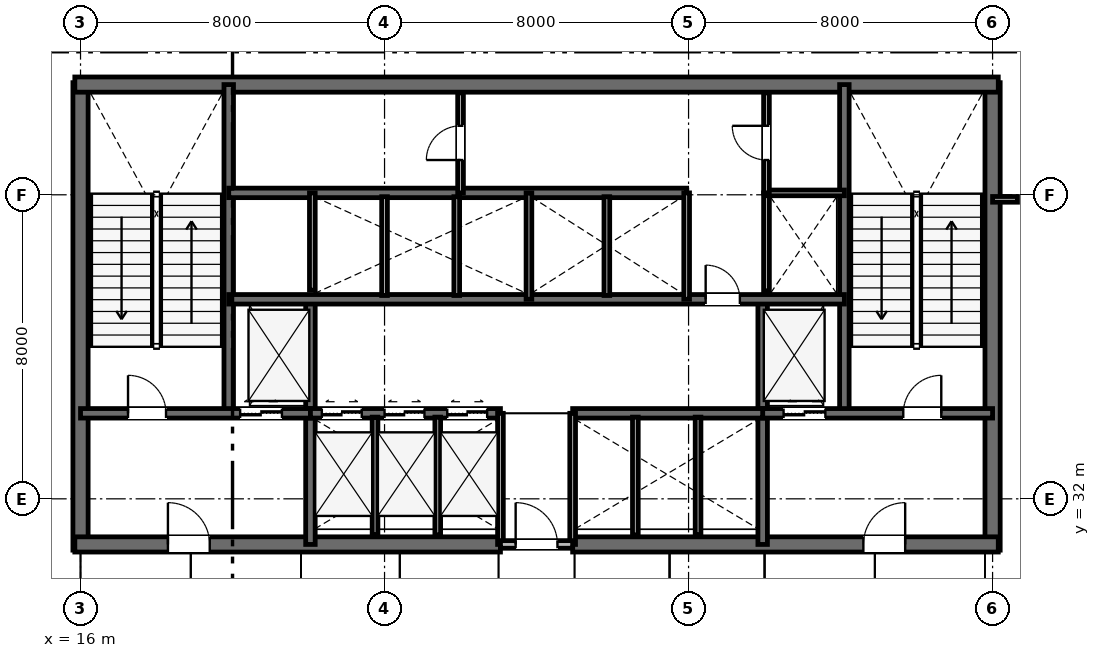
"""IFC4 building model, lengths in metres.
Left out: names, types, materials, properties, quantities, classifications, styles, units other than length and angle.
Written with IfcOpenShell. Run it as: python <this file> out.ifc"""

import sys

from ifc_helpers import new_model, si_unit, direction, frame, frame_2d, origin, place, context, subcontext, project, spatial, rectangle, extrude, element, fill, save


model = new_model("IFC4")
c1 = context("Model", 3, precision=1e-05, world=origin(), true_north=direction((0.0, 1.0)))
c2 = subcontext(c1, "Body", "Model", "MODEL_VIEW")
j1 = project(units=[si_unit("LENGTHUNIT", "METRE"), si_unit("PLANEANGLEUNIT", "RADIAN")], contexts=[c1])
p1 = place(None, origin())
s1 = spatial("IfcSite", under=j1, at=p1, CompositionType="ELEMENT")
p2 = place(p1, origin())
s2 = spatial("IfcBuilding", under=s1, at=p2, CompositionType="ELEMENT")
p3 = place(p2, frame((0.0, 0.0, 21.3)))
s3 = spatial("IfcBuildingStorey", under=s2, at=p3, CompositionType="ELEMENT", Elevation=21.3)
for number, where, z_axis, x_axis in (
    (1, (16.0, 30.65, 0.0), (0.0, 0.0, 1.0), (0.0, 1.0, 0.0)),
    (2, (40.0, 30.65, 0.0), (0.0, 0.0, 1.0), (0.0, 1.0, 0.0)),
):
    element("IfcWall", number, at=place(p3, frame(where, z_axis=z_axis, x_axis=x_axis)), inside=s3, PredefinedType="SHEAR", context=c2, shape_type="SweptSolid", body=[
        extrude(rectangle(XDim=12.3, YDim=0.4, at=frame_2d((6.15, 0.0))), origin(), (0.0, 0.0, 1.0), 4.5),
    ])
p4 = place(p3, frame((15.85, 42.9, 0.0), z_axis=(0.0, 0.0, 1.0), x_axis=(1.0, 0.0, 0.0)))
e3 = element("IfcWall", 3, at=p4, inside=s3, PredefinedType="SHEAR", context=c2, shape_type="SweptSolid", body=[
    extrude(rectangle(XDim=24.3, YDim=0.4, at=frame_2d((12.15, 0.0))), origin(), (0.0, 0.0, 1.0), 4.5),
])
p5 = place(p3, frame((15.85, 30.8, 0.0), z_axis=(0.0, 0.0, 1.0), x_axis=(1.0, 0.0, 0.0)))
e4 = element("IfcWall", 4, at=p5, inside=s3, PredefinedType="SHEAR", context=c2, shape_type="SweptSolid", body=[
    extrude(rectangle(XDim=11.2, YDim=0.4, at=frame_2d((5.6, 0.0))), origin(), (0.0, 0.0, 1.0), 4.5),
])
p6 = place(p5, frame((2.45, 0.0, 0.0)))
e5 = element("IfcOpeningElement", 5, at=p6, cuts=e4, PredefinedType="OPENING", context=c2, shape_type="SweptSolid", body=[
    extrude(rectangle(XDim=1.1, YDim=2.15, at=frame_2d((0.55, 1.075))), frame((0.0, 0.21, 0.0), z_axis=(0.0, -1.0, 0.0), x_axis=(1.0, 0.0, 0.0)), (0.0, 0.0, 1.0), 0.42),
])
p7 = place(p3, frame((28.95, 30.8, 0.0), z_axis=(0.0, 0.0, 1.0), x_axis=(1.0, 0.0, 0.0)))
e6 = element("IfcWall", 6, at=p7, inside=s3, PredefinedType="SHEAR", context=c2, shape_type="SweptSolid", body=[
    extrude(rectangle(XDim=11.2, YDim=0.4, at=frame_2d((5.6, 0.0))), origin(), (0.0, 0.0, 1.0), 4.5),
])
p8 = place(p7, frame((7.65, 0.0, 0.0)))
e7 = element("IfcOpeningElement", 7, at=p8, cuts=e6, PredefinedType="OPENING", context=c2, shape_type="SweptSolid", body=[
    extrude(rectangle(XDim=1.1, YDim=2.15, at=frame_2d((0.55, 1.075))), frame((0.0, 0.21, 0.0), z_axis=(0.0, -1.0, 0.0), x_axis=(1.0, 0.0, 0.0)), (0.0, 0.0, 1.0), 0.42),
])
for number, where, z_axis, x_axis in (
    (8, (19.9, 34.25, 0.0), (0.0, 0.0, 1.0), (0.0, 1.0, 0.0)),
    (9, (36.1, 34.25, 0.0), (0.0, 0.0, 1.0), (0.0, 1.0, 0.0)),
):
    element("IfcWall", number, at=place(p3, frame(where, z_axis=z_axis, x_axis=x_axis)), inside=s3, PredefinedType="SHEAR", context=c2, shape_type="SweptSolid", body=[
        extrude(rectangle(XDim=8.65, YDim=0.25, at=frame_2d((4.325, 0.0))), origin(), (0.0, 0.0, 1.0), 4.5),
    ])
for number, where, z_axis, x_axis in (
    (10, (22.05, 30.8, 0.0), (0.0, 0.0, 1.0), (0.0, 1.0, 0.0)),
    (11, (33.95, 30.8, 0.0), (0.0, 0.0, 1.0), (0.0, 1.0, 0.0)),
):
    element("IfcWall", number, at=place(p3, frame(where, z_axis=z_axis, x_axis=x_axis)), inside=s3, PredefinedType="SHEAR", context=c2, shape_type="SweptSolid", body=[
        extrude(rectangle(XDim=6.45, YDim=0.25, at=frame_2d((3.225, 0.0))), origin(), (0.0, 0.0, 1.0), 4.5),
    ])
p9 = place(p3, frame((16.0, 34.25, 0.0), z_axis=(0.0, 0.0, 1.0), x_axis=(1.0, 0.0, 0.0)))
e12 = element("IfcWall", 12, at=p9, inside=s3, PredefinedType="SHEAR", context=c2, shape_type="SweptSolid", body=[
    extrude(rectangle(XDim=6.05, YDim=0.25, at=frame_2d((3.025, 0.0))), origin(), (0.0, 0.0, 1.0), 4.5),
])
p10 = place(p9, frame((1.25, 0.0, 0.0)))
e13 = element("IfcOpeningElement", 13, at=p10, cuts=e12, PredefinedType="OPENING", context=c2, shape_type="SweptSolid", body=[
    extrude(rectangle(XDim=1.0, YDim=2.15, at=frame_2d((0.5, 1.075))), frame((0.0, 0.135, 0.0), z_axis=(0.0, -1.0, 0.0), x_axis=(1.0, 0.0, 0.0)), (0.0, 0.0, 1.0), 0.27),
])
p11 = place(p9, frame((4.2, 0.0, 0.0)))
e14 = element("IfcOpeningElement", 14, at=p11, cuts=e12, PredefinedType="OPENING", context=c2, shape_type="SweptSolid", body=[
    extrude(rectangle(XDim=1.1, YDim=2.15, at=frame_2d((0.55, 1.075))), frame((0.0, 0.135, 0.0), z_axis=(0.0, -1.0, 0.0), x_axis=(1.0, 0.0, 0.0)), (0.0, 0.0, 1.0), 0.27),
])
p12 = place(p3, frame((33.95, 34.25, 0.0), z_axis=(0.0, 0.0, 1.0), x_axis=(1.0, 0.0, 0.0)))
e15 = element("IfcWall", 15, at=p12, inside=s3, PredefinedType="SHEAR", context=c2, shape_type="SweptSolid", body=[
    extrude(rectangle(XDim=6.05, YDim=0.25, at=frame_2d((3.025, 0.0))), origin(), (0.0, 0.0, 1.0), 4.5),
])
p13 = place(p12, frame((3.7, 0.0, 0.0)))
e16 = element("IfcOpeningElement", 16, at=p13, cuts=e15, PredefinedType="OPENING", context=c2, shape_type="SweptSolid", body=[
    extrude(rectangle(XDim=1.0, YDim=2.15, at=frame_2d((0.5, 1.075))), frame((0.0, 0.135, 0.0), z_axis=(0.0, -1.0, 0.0), x_axis=(1.0, 0.0, 0.0)), (0.0, 0.0, 1.0), 0.27),
])
p14 = place(p12, frame((0.55, 0.0, 0.0)))
e17 = element("IfcOpeningElement", 17, at=p14, cuts=e15, PredefinedType="OPENING", context=c2, shape_type="SweptSolid", body=[
    extrude(rectangle(XDim=1.1, YDim=2.15, at=frame_2d((0.55, 1.075))), frame((0.0, 0.135, 0.0), z_axis=(0.0, -1.0, 0.0), x_axis=(1.0, 0.0, 0.0)), (0.0, 0.0, 1.0), 0.27),
])
p15 = place(p3, frame((22.05, 34.25, 0.0), z_axis=(0.0, 0.0, 1.0), x_axis=(1.0, 0.0, 0.0)))
e18 = element("IfcWall", 18, at=p15, inside=s3, PredefinedType="SHEAR", context=c2, shape_type="SweptSolid", body=[
    extrude(rectangle(XDim=5.0, YDim=0.25, at=frame_2d((2.5, 0.0))), origin(), (0.0, 0.0, 1.0), 4.5),
])
p16 = place(p15, frame((0.3, 0.0, 0.0)))
e19 = element("IfcOpeningElement", 19, at=p16, cuts=e18, PredefinedType="OPENING", context=c2, shape_type="SweptSolid", body=[
    extrude(rectangle(XDim=1.05, YDim=2.15, at=frame_2d((0.525, 1.075))), frame((0.0, 0.135, 0.0), z_axis=(0.0, -1.0, 0.0), x_axis=(1.0, 0.0, 0.0)), (0.0, 0.0, 1.0), 0.27),
])
p17 = place(p15, frame((1.95, 0.0, 0.0)))
e20 = element("IfcOpeningElement", 20, at=p17, cuts=e18, PredefinedType="OPENING", context=c2, shape_type="SweptSolid", body=[
    extrude(rectangle(XDim=1.05, YDim=2.15, at=frame_2d((0.525, 1.075))), frame((0.0, 0.135, 0.0), z_axis=(0.0, -1.0, 0.0), x_axis=(1.0, 0.0, 0.0)), (0.0, 0.0, 1.0), 0.27),
])
p18 = place(p15, frame((3.6, 0.0, 0.0)))
e21 = element("IfcOpeningElement", 21, at=p18, cuts=e18, PredefinedType="OPENING", context=c2, shape_type="SweptSolid", body=[
    extrude(rectangle(XDim=1.05, YDim=2.15, at=frame_2d((0.525, 1.075))), frame((0.0, 0.135, 0.0), z_axis=(0.0, -1.0, 0.0), x_axis=(1.0, 0.0, 0.0)), (0.0, 0.0, 1.0), 0.27),
])
p19 = place(p3, frame((28.95, 34.25, 0.0), z_axis=(0.0, 0.0, 1.0), x_axis=(1.0, 0.0, 0.0)))
e22 = element("IfcWall", 22, at=p19, inside=s3, PredefinedType="SHEAR", context=c2, shape_type="SweptSolid", body=[
    extrude(rectangle(XDim=5.0, YDim=0.25, at=frame_2d((2.5, 0.0))), origin(), (0.0, 0.0, 1.0), 4.5),
])
p20 = place(p3, frame((19.9, 37.25, 0.0), z_axis=(0.0, 0.0, 1.0), x_axis=(1.0, 0.0, 0.0)))
e23 = element("IfcWall", 23, at=p20, inside=s3, PredefinedType="SHEAR", context=c2, shape_type="SweptSolid", body=[
    extrude(rectangle(XDim=16.2, YDim=0.25, at=frame_2d((8.1, 0.0))), origin(), (0.0, 0.0, 1.0), 4.5),
])
p21 = place(p20, frame((12.55, 0.0, 0.0)))
e24 = element("IfcOpeningElement", 24, at=p21, cuts=e23, PredefinedType="OPENING", context=c2, shape_type="SweptSolid", body=[
    extrude(rectangle(XDim=0.9, YDim=2.15, at=frame_2d((0.45, 1.075))), frame((0.0, 0.135, 0.0), z_axis=(0.0, -1.0, 0.0), x_axis=(1.0, 0.0, 0.0)), (0.0, 0.0, 1.0), 0.27),
])
p22 = place(p3, frame((19.9, 40.05, 0.0), z_axis=(0.0, 0.0, 1.0), x_axis=(1.0, 0.0, 0.0)))
e25 = element("IfcWall", 25, at=p22, inside=s3, PredefinedType="SHEAR", context=c2, shape_type="SweptSolid", body=[
    extrude(rectangle(XDim=12.05, YDim=0.25, at=frame_2d((6.025, 0.0))), origin(), (0.0, 0.0, 1.0), 4.5),
])
for number, where, z_axis, x_axis in (
    (26, (27.05, 30.8, 0.0), (0.0, 0.0, 1.0), (0.0, 1.0, 0.0)),
    (27, (28.95, 30.8, 0.0), (0.0, 0.0, 1.0), (0.0, 1.0, 0.0)),
):
    element("IfcWall", number, at=place(p3, frame(where, z_axis=z_axis, x_axis=x_axis)), inside=s3, PredefinedType="PLUMBINGWALL", context=c2, shape_type="SweptSolid", body=[
        extrude(rectangle(XDim=3.45, YDim=0.15, at=frame_2d((1.725, 0.0))), origin(), (0.0, 0.0, 1.0), 4.23),
    ])
p23 = place(p3, frame((27.05, 30.8, 0.0), z_axis=(0.0, 0.0, 1.0), x_axis=(1.0, 0.0, 0.0)))
e28 = element("IfcWall", 28, at=p23, inside=s3, PredefinedType="PARTITIONING", context=c2, shape_type="SweptSolid", body=[
    extrude(rectangle(XDim=1.9, YDim=0.2, at=frame_2d((0.95, 0.0))), origin(), (0.0, 0.0, 1.0), 4.23),
])
p24 = place(p23, frame((0.4, 0.0, 0.0)))
e29 = element("IfcOpeningElement", 29, at=p24, cuts=e28, PredefinedType="OPENING", context=c2, shape_type="SweptSolid", body=[
    extrude(rectangle(XDim=1.1, YDim=2.15, at=frame_2d((0.55, 1.075))), frame((0.0, 0.11, 0.0), z_axis=(0.0, -1.0, 0.0), x_axis=(1.0, 0.0, 0.0)), (0.0, 0.0, 1.0), 0.22),
])
for number, where, z_axis, x_axis in (
    (30, (23.75, 31.05, 0.0), (0.0, 0.0, 1.0), (0.0, 1.0, 0.0)),
    (31, (25.4, 31.05, 0.0), (0.0, 0.0, 1.0), (0.0, 1.0, 0.0)),
    (32, (30.6, 31.05, 0.0), (0.0, 0.0, 1.0), (0.0, 1.0, 0.0)),
    (33, (32.25, 31.05, 0.0), (0.0, 0.0, 1.0), (0.0, 1.0, 0.0)),
):
    element("IfcWall", number, at=place(p3, frame(where, z_axis=z_axis, x_axis=x_axis)), inside=s3, PredefinedType="PLUMBINGWALL", context=c2, shape_type="SweptSolid", body=[
        extrude(rectangle(XDim=3.1, YDim=0.15, at=frame_2d((1.55, 0.0))), origin(), (0.0, 0.0, 1.0), 4.23),
    ])
p25 = place(p3, frame((22.1, 37.49, 0.0), z_axis=(0.0, 0.0, 1.0), x_axis=(0.0, 1.0, 0.0)))
e34 = element("IfcWall", 34, at=p25, inside=s3, PredefinedType="PLUMBINGWALL", context=c2, shape_type="SweptSolid", body=[
    extrude(rectangle(XDim=2.56, YDim=0.15, at=frame_2d((1.28, 0.0))), origin(), (0.0, 0.0, 1.0), 4.23),
])
p26 = place(p3, frame((27.8, 37.25, 0.0), z_axis=(0.0, 0.0, 1.0), x_axis=(0.0, 1.0, 0.0)))
e35 = element("IfcWall", 35, at=p26, inside=s3, PredefinedType="PLUMBINGWALL", context=c2, shape_type="SweptSolid", body=[
    extrude(rectangle(XDim=2.8, YDim=0.15, at=frame_2d((1.4, 0.0))), origin(), (0.0, 0.0, 1.0), 4.23),
])
for number, where, z_axis, x_axis in (
    (36, (24.0, 37.35, 0.0), (0.0, 0.0, 1.0), (0.0, 1.0, 0.0)),
    (37, (25.9, 37.35, 0.0), (0.0, 0.0, 1.0), (0.0, 1.0, 0.0)),
):
    element("IfcWall", number, at=place(p3, frame(where, z_axis=z_axis, x_axis=x_axis)), inside=s3, PredefinedType="PLUMBINGWALL", context=c2, shape_type="SweptSolid", body=[
        extrude(rectangle(XDim=2.6, YDim=0.15, at=frame_2d((1.3, 0.0))), origin(), (0.0, 0.0, 1.0), 4.23),
    ])
p27 = place(p3, frame((31.95, 37.25, 0.0), z_axis=(0.0, 0.0, 1.0), x_axis=(0.0, 1.0, 0.0)))
e38 = element("IfcWall", 38, at=p27, inside=s3, PredefinedType="PLUMBINGWALL", context=c2, shape_type="SweptSolid", body=[
    extrude(rectangle(XDim=2.8, YDim=0.15, at=frame_2d((1.4, 0.0))), origin(), (0.0, 0.0, 1.0), 4.23),
])
p28 = place(p3, frame((29.85, 37.35, 0.0), z_axis=(0.0, 0.0, 1.0), x_axis=(0.0, 1.0, 0.0)))
e39 = element("IfcWall", 39, at=p28, inside=s3, PredefinedType="PLUMBINGWALL", context=c2, shape_type="SweptSolid", body=[
    extrude(rectangle(XDim=2.6, YDim=0.15, at=frame_2d((1.3, 0.0))), origin(), (0.0, 0.0, 1.0), 4.23),
])
p29 = place(p3, frame((34.05, 37.473, 0.0), z_axis=(0.0, 0.0, 1.0), x_axis=(0.0, 1.0, 0.0)))
e40 = element("IfcWall", 40, at=p29, inside=s3, PredefinedType="PLUMBINGWALL", context=c2, shape_type="SweptSolid", body=[
    extrude(rectangle(XDim=2.577, YDim=0.15, at=frame_2d((1.288, 0.0))), origin(), (0.0, 0.0, 1.0), 4.23),
])
p30 = place(p3, frame((34.05, 40.05, 0.0), z_axis=(0.0, 0.0, 1.0), x_axis=(1.0, 0.0, 0.0)))
e41 = element("IfcWall", 41, at=p30, inside=s3, PredefinedType="PARTITIONING", context=c2, shape_type="SweptSolid", body=[
    extrude(rectangle(XDim=2.05, YDim=0.15, at=frame_2d((1.025, 0.0))), origin(), (0.0, 0.0, 1.0), 4.23),
])
p31 = place(p3, frame((34.05, 40.05, 0.0), z_axis=(0.0, 0.0, 1.0), x_axis=(0.0, 1.0, 0.0)))
e42 = element("IfcWall", 42, at=p31, inside=s3, PredefinedType="PARTITIONING", context=c2, shape_type="SweptSolid", body=[
    extrude(rectangle(XDim=2.63, YDim=0.15, at=frame_2d((1.315, 0.0))), origin(), (0.0, 0.0, 1.0), 4.23),
])
p32 = place(p31, frame((0.865, 0.0, 0.0)))
e43 = element("IfcOpeningElement", 43, at=p32, cuts=e42, PredefinedType="OPENING", context=c2, shape_type="SweptSolid", body=[
    extrude(rectangle(XDim=0.9, YDim=2.15, at=frame_2d((0.45, 1.075))), frame((0.0, 0.085, 0.0), z_axis=(0.0, -1.0, 0.0), x_axis=(1.0, 0.0, 0.0)), (0.0, 0.0, 1.0), 0.17),
])
p33 = place(p3, frame((26.0, 40.05, 0.0), z_axis=(0.0, 0.0, 1.0), x_axis=(0.0, 1.0, 0.0)))
e44 = element("IfcWall", 44, at=p33, inside=s3, PredefinedType="PARTITIONING", context=c2, shape_type="SweptSolid", body=[
    extrude(rectangle(XDim=2.63, YDim=0.15, at=frame_2d((1.315, 0.0))), origin(), (0.0, 0.0, 1.0), 4.23),
])
p34 = place(p33, frame((0.865, 0.0, 0.0)))
e45 = element("IfcOpeningElement", 45, at=p34, cuts=e44, PredefinedType="OPENING", context=c2, shape_type="SweptSolid", body=[
    extrude(rectangle(XDim=0.9, YDim=2.15, at=frame_2d((0.45, 1.075))), frame((0.0, 0.085, 0.0), z_axis=(0.0, -1.0, 0.0), x_axis=(1.0, 0.0, 0.0)), (0.0, 0.0, 1.0), 0.17),
])
p35 = place(p3, frame((40.0, 39.88, 0.0), z_axis=(0.0, 0.0, 1.0), x_axis=(1.0, 0.0, 0.0)))
e46 = element("IfcWall", 46, at=p35, inside=s3, PredefinedType="PARTITIONING", context=c2, shape_type="SweptSolid", body=[
    extrude(rectangle(XDim=0.655, YDim=0.15, at=frame_2d((0.328, 0.0))), origin(), (0.0, 0.0, 1.0), 4.23),
])
p36 = place(p24, origin())
e47 = element("IfcDoor", 47, at=p36, inside=s3, OperationType="SINGLE_SWING_LEFT", PredefinedType="DOOR", context=c2, shape_type="SweptSolid", body=[
    extrude(rectangle(XDim=1.1, YDim=2.15, at=frame_2d((0.55, 1.075))), frame((0.0, 0.025, 0.0), z_axis=(0.0, -1.0, 0.0), x_axis=(1.0, 0.0, 0.0)), (0.0, 0.0, 1.0), 0.05),
])
fill(e29, e47)
p37 = place(p10, origin())
e48 = element("IfcDoor", 48, at=p37, inside=s3, OperationType="SINGLE_SWING_LEFT", PredefinedType="DOOR", context=c2, shape_type="SweptSolid", body=[
    extrude(rectangle(XDim=1.0, YDim=2.15, at=frame_2d((0.5, 1.075))), frame((0.0, 0.025, 0.0), z_axis=(0.0, -1.0, 0.0), x_axis=(1.0, 0.0, 0.0)), (0.0, 0.0, 1.0), 0.05),
])
fill(e13, e48)
p38 = place(p13, origin())
e49 = element("IfcDoor", 49, at=p38, inside=s3, OperationType="SINGLE_SWING_RIGHT", PredefinedType="DOOR", context=c2, shape_type="SweptSolid", body=[
    extrude(rectangle(XDim=1.0, YDim=2.15, at=frame_2d((0.5, 1.075))), frame((0.0, 0.025, 0.0), z_axis=(0.0, -1.0, 0.0), x_axis=(1.0, 0.0, 0.0)), (0.0, 0.0, 1.0), 0.05),
])
fill(e16, e49)
p39 = place(p6, origin())
e50 = element("IfcDoor", 50, at=p39, inside=s3, OperationType="SINGLE_SWING_LEFT", PredefinedType="DOOR", context=c2, shape_type="SweptSolid", body=[
    extrude(rectangle(XDim=1.1, YDim=2.15, at=frame_2d((0.55, 1.075))), frame((0.0, 0.025, 0.0), z_axis=(0.0, -1.0, 0.0), x_axis=(1.0, 0.0, 0.0)), (0.0, 0.0, 1.0), 0.05),
])
fill(e5, e50)
p40 = place(p8, origin())
e51 = element("IfcDoor", 51, at=p40, inside=s3, OperationType="SINGLE_SWING_RIGHT", PredefinedType="DOOR", context=c2, shape_type="SweptSolid", body=[
    extrude(rectangle(XDim=1.1, YDim=2.15, at=frame_2d((0.55, 1.075))), frame((0.0, 0.025, 0.0), z_axis=(0.0, -1.0, 0.0), x_axis=(1.0, 0.0, 0.0)), (0.0, 0.0, 1.0), 0.05),
])
fill(e7, e51)
p41 = place(p21, origin())
e52 = element("IfcDoor", 52, at=p41, inside=s3, OperationType="SINGLE_SWING_LEFT", PredefinedType="DOOR", context=c2, shape_type="SweptSolid", body=[
    extrude(rectangle(XDim=0.9, YDim=2.15, at=frame_2d((0.45, 1.075))), frame((0.0, 0.025, 0.0), z_axis=(0.0, -1.0, 0.0), x_axis=(1.0, 0.0, 0.0)), (0.0, 0.0, 1.0), 0.05),
])
fill(e24, e52)
p42 = place(p32, origin())
e53 = element("IfcDoor", 53, at=p42, inside=s3, OperationType="SINGLE_SWING_RIGHT", PredefinedType="DOOR", context=c2, shape_type="SweptSolid", body=[
    extrude(rectangle(XDim=0.9, YDim=2.15, at=frame_2d((0.45, 1.075))), frame((0.0, 0.025, 0.0), z_axis=(0.0, -1.0, 0.0), x_axis=(1.0, 0.0, 0.0)), (0.0, 0.0, 1.0), 0.05),
])
fill(e43, e53)
p43 = place(p34, origin())
e54 = element("IfcDoor", 54, at=p43, inside=s3, OperationType="SINGLE_SWING_LEFT", PredefinedType="DOOR", context=c2, shape_type="SweptSolid", body=[
    extrude(rectangle(XDim=0.9, YDim=2.15, at=frame_2d((0.45, 1.075))), frame((0.0, 0.025, 0.0), z_axis=(0.0, -1.0, 0.0), x_axis=(1.0, 0.0, 0.0)), (0.0, 0.0, 1.0), 0.05),
])
fill(e45, e54)
p44 = place(p11, origin())
e55 = element("IfcDoor", 55, at=p44, inside=s3, OperationType="DOUBLE_DOOR_SLIDING", PredefinedType="DOOR", context=c2, shape_type="SweptSolid", body=[
    extrude(rectangle(XDim=1.1, YDim=2.15, at=frame_2d((0.55, 1.075))), frame((0.0, 0.025, 0.0), z_axis=(0.0, -1.0, 0.0), x_axis=(1.0, 0.0, 0.0)), (0.0, 0.0, 1.0), 0.05),
])
fill(e14, e55)
p45 = place(p14, origin())
e56 = element("IfcDoor", 56, at=p45, inside=s3, OperationType="DOUBLE_DOOR_SLIDING", PredefinedType="DOOR", context=c2, shape_type="SweptSolid", body=[
    extrude(rectangle(XDim=1.1, YDim=2.15, at=frame_2d((0.55, 1.075))), frame((0.0, 0.025, 0.0), z_axis=(0.0, -1.0, 0.0), x_axis=(1.0, 0.0, 0.0)), (0.0, 0.0, 1.0), 0.05),
])
fill(e17, e56)
p46 = place(p16, origin())
e57 = element("IfcDoor", 57, at=p46, inside=s3, OperationType="DOUBLE_DOOR_SLIDING", PredefinedType="DOOR", context=c2, shape_type="SweptSolid", body=[
    extrude(rectangle(XDim=1.05, YDim=2.15, at=frame_2d((0.525, 1.075))), frame((0.0, 0.025, 0.0), z_axis=(0.0, -1.0, 0.0), x_axis=(1.0, 0.0, 0.0)), (0.0, 0.0, 1.0), 0.05),
])
fill(e19, e57)
p47 = place(p17, origin())
e58 = element("IfcDoor", 58, at=p47, inside=s3, OperationType="DOUBLE_DOOR_SLIDING", PredefinedType="DOOR", context=c2, shape_type="SweptSolid", body=[
    extrude(rectangle(XDim=1.05, YDim=2.15, at=frame_2d((0.525, 1.075))), frame((0.0, 0.025, 0.0), z_axis=(0.0, -1.0, 0.0), x_axis=(1.0, 0.0, 0.0)), (0.0, 0.0, 1.0), 0.05),
])
fill(e20, e58)
p48 = place(p18, origin())
e59 = element("IfcDoor", 59, at=p48, inside=s3, OperationType="DOUBLE_DOOR_SLIDING", PredefinedType="DOOR", context=c2, shape_type="SweptSolid", body=[
    extrude(rectangle(XDim=1.05, YDim=2.15, at=frame_2d((0.525, 1.075))), frame((0.0, 0.025, 0.0), z_axis=(0.0, -1.0, 0.0), x_axis=(1.0, 0.0, 0.0)), (0.0, 0.0, 1.0), 0.05),
])
fill(e21, e59)
save(model, sys.argv[1])
